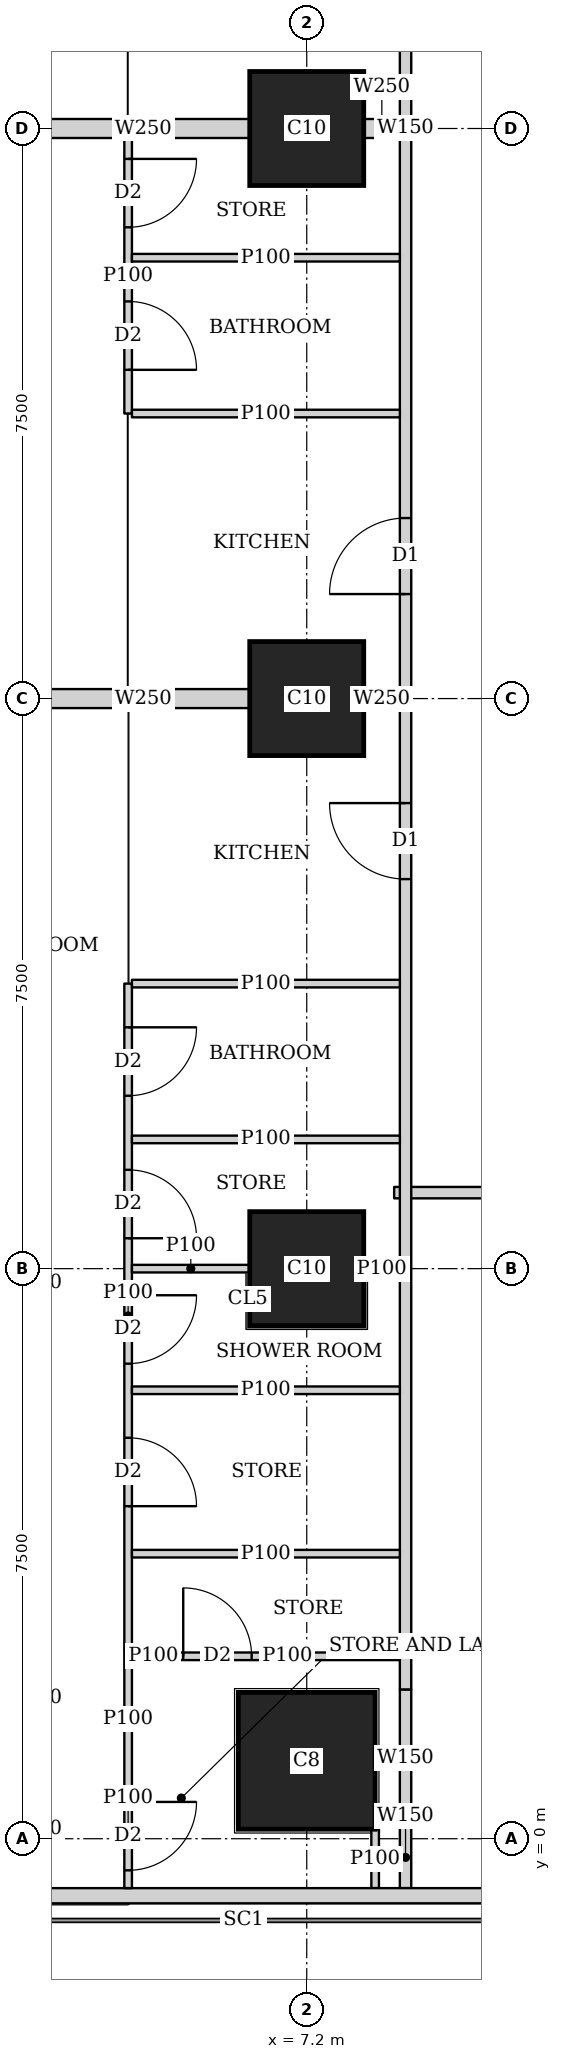
"""IFC4 building model, lengths in metres.
Left out: names, types, materials, properties, quantities, classifications, styles, units other than length and angle.
Written with IfcOpenShell. Run it as: python <this file> out.ifc"""

import sys

from ifc_helpers import new_model, si_unit, direction, frame, frame_2d, origin, origin_2d, place, context, subcontext, project, spatial, rectangle, extrude, element, fill, save


model = new_model("IFC4")
c1 = context("Model", 3, precision=1e-05, world=origin(), true_north=direction((0.0, 1.0)))
c2 = subcontext(c1, "Body", "Model", "MODEL_VIEW")
j1 = project(units=[si_unit("LENGTHUNIT", "METRE"), si_unit("PLANEANGLEUNIT", "RADIAN")], contexts=[c1])
p1 = place(None, origin())
s1 = spatial("IfcSite", under=j1, at=p1, CompositionType="ELEMENT")
p2 = place(p1, origin())
s2 = spatial("IfcBuilding", under=s1, at=p2, CompositionType="ELEMENT")
p3 = place(p2, frame((0.0, 0.0, 184.55)))
s3 = spatial("IfcBuildingStorey", under=s2, at=p3, CompositionType="ELEMENT", Elevation=184.55)
p4 = place(p3, frame((7.2, 1.025, 0.0), z_axis=(0.0, 0.0, 1.0), x_axis=(1.0, 0.0, 0.0)))
e1 = element("IfcColumn", 1, at=p4, inside=s3, PredefinedType="COLUMN", context=c2, shape_type="SweptSolid", body=[
    extrude(rectangle(XDim=1.8, YDim=1.8, at=origin_2d()), origin(), (0.0, 0.0, 1.0), 3.75),
])
for number, where, z_axis, x_axis in (
    (2, (7.2, 7.5, 0.0), (0.0, 0.0, 1.0), (1.0, 0.0, 0.0)),
    (3, (7.2, 15.0, 0.0), (0.0, 0.0, 1.0), (1.0, 0.0, 0.0)),
    (4, (7.2, 22.5, 0.0), (0.0, 0.0, 1.0), (1.0, 0.0, 0.0)),
):
    element("IfcColumn", number, at=place(p3, frame(where, z_axis=z_axis, x_axis=x_axis)), inside=s3, PredefinedType="COLUMN", context=c2, shape_type="SweptSolid", body=[
        extrude(rectangle(XDim=1.5, YDim=1.5, at=origin_2d()), origin(), (0.0, 0.0, 1.0), 3.75),
    ])
p5 = place(p3, frame((2.163, -0.75, 0.0), z_axis=(0.0, 0.0, 1.0), x_axis=(1.0, 0.0, 0.0)))
e5 = element("IfcWall", 5, at=p5, inside=s3, PredefinedType="SOLIDWALL", context=c2, shape_type="SweptSolid", body=[
    extrude(rectangle(XDim=45.628, YDim=0.2, at=frame_2d((22.814, 0.0))), origin(), (0.0, 0.0, 1.0), 3.45),
])
p6 = place(p5, frame((9.537, 0.0, 0.9)))
e6 = element("IfcOpeningElement", 6, at=p6, cuts=e5, PredefinedType="OPENING", context=c2, shape_type="SweptSolid", body=[
    extrude(rectangle(XDim=1.8, YDim=1.5, at=frame_2d((0.9, 0.75))), frame((0.0, 0.11, 0.0), z_axis=(0.0, -1.0, 0.0), x_axis=(1.0, 0.0, 0.0)), (0.0, 0.0, 1.0), 0.22),
])
p7 = place(p5, frame((13.137, 0.0, 0.9)))
e7 = element("IfcOpeningElement", 7, at=p7, cuts=e5, PredefinedType="OPENING", context=c2, shape_type="SweptSolid", body=[
    extrude(rectangle(XDim=1.8, YDim=1.5, at=frame_2d((0.9, 0.75))), frame((0.0, 0.11, 0.0), z_axis=(0.0, -1.0, 0.0), x_axis=(1.0, 0.0, 0.0)), (0.0, 0.0, 1.0), 0.22),
])
p8 = place(p5, frame((16.737, 0.0, 0.9)))
e8 = element("IfcOpeningElement", 8, at=p8, cuts=e5, PredefinedType="OPENING", context=c2, shape_type="SweptSolid", body=[
    extrude(rectangle(XDim=1.8, YDim=1.5, at=frame_2d((0.9, 0.75))), frame((0.0, 0.11, 0.0), z_axis=(0.0, -1.0, 0.0), x_axis=(1.0, 0.0, 0.0)), (0.0, 0.0, 1.0), 0.22),
])
p9 = place(p5, frame((20.337, 0.0, 0.9)))
e9 = element("IfcOpeningElement", 9, at=p9, cuts=e5, PredefinedType="OPENING", context=c2, shape_type="SweptSolid", body=[
    extrude(rectangle(XDim=1.8, YDim=1.5, at=frame_2d((0.9, 0.75))), frame((0.0, 0.11, 0.0), z_axis=(0.0, -1.0, 0.0), x_axis=(1.0, 0.0, 0.0)), (0.0, 0.0, 1.0), 0.22),
])
p10 = place(p5, frame((23.937, 0.0, 0.9)))
e10 = element("IfcOpeningElement", 10, at=p10, cuts=e5, PredefinedType="OPENING", context=c2, shape_type="SweptSolid", body=[
    extrude(rectangle(XDim=1.8, YDim=1.5, at=frame_2d((0.9, 0.75))), frame((0.0, 0.11, 0.0), z_axis=(0.0, -1.0, 0.0), x_axis=(1.0, 0.0, 0.0)), (0.0, 0.0, 1.0), 0.22),
])
p11 = place(p5, frame((27.537, 0.0, 0.9)))
e11 = element("IfcOpeningElement", 11, at=p11, cuts=e5, PredefinedType="OPENING", context=c2, shape_type="SweptSolid", body=[
    extrude(rectangle(XDim=1.8, YDim=1.5, at=frame_2d((0.9, 0.75))), frame((0.0, 0.11, 0.0), z_axis=(0.0, -1.0, 0.0), x_axis=(1.0, 0.0, 0.0)), (0.0, 0.0, 1.0), 0.22),
])
p12 = place(p5, frame((31.137, 0.0, 0.9)))
e12 = element("IfcOpeningElement", 12, at=p12, cuts=e5, PredefinedType="OPENING", context=c2, shape_type="SweptSolid", body=[
    extrude(rectangle(XDim=1.8, YDim=1.5, at=frame_2d((0.9, 0.75))), frame((0.0, 0.11, 0.0), z_axis=(0.0, -1.0, 0.0), x_axis=(1.0, 0.0, 0.0)), (0.0, 0.0, 1.0), 0.22),
])
p13 = place(p5, frame((34.737, 0.0, 0.9)))
e13 = element("IfcOpeningElement", 13, at=p13, cuts=e5, PredefinedType="OPENING", context=c2, shape_type="SweptSolid", body=[
    extrude(rectangle(XDim=1.8, YDim=1.5, at=frame_2d((0.9, 0.75))), frame((0.0, 0.11, 0.0), z_axis=(0.0, -1.0, 0.0), x_axis=(1.0, 0.0, 0.0)), (0.0, 0.0, 1.0), 0.22),
])
p14 = place(p3, frame((8.5, -0.65, 0.0), z_axis=(0.0, 0.0, 1.0), x_axis=(0.0, 1.0, 0.0)))
e14 = element("IfcWall", 14, at=p14, inside=s3, PredefinedType="SOLIDWALL", context=c2, shape_type="SweptSolid", body=[
    extrude(rectangle(XDim=0.809, YDim=0.15, at=frame_2d((0.404, 0.0))), origin(), (0.0, 0.0, 1.0), 3.45),
])
p15 = place(p3, frame((8.5, 0.159, 0.0), z_axis=(0.0, 0.0, 1.0), x_axis=(0.0, 1.0, 0.0)))
e15 = element("IfcWall", 15, at=p15, inside=s3, PredefinedType="SOLIDWALL", context=c2, shape_type="SweptSolid", body=[
    extrude(rectangle(XDim=1.805, YDim=0.15, at=frame_2d((0.903, 0.0))), origin(), (0.0, 0.0, 1.0), 2.05),
])
p16 = place(p3, frame((8.5, 1.964, 0.0), z_axis=(0.0, 0.0, 1.0), x_axis=(0.0, 1.0, 0.0)))
e16 = element("IfcWall", 16, at=p16, inside=s3, PredefinedType="SOLIDWALL", context=c2, shape_type="SweptSolid", body=[
    extrude(rectangle(XDim=41.097, YDim=0.15, at=frame_2d((20.548, 0.0))), origin(), (0.0, 0.0, 1.0), 3.45),
])
p17 = place(p16, frame((10.661, 0.0, 0.0)))
e17 = element("IfcOpeningElement", 17, at=p17, cuts=e16, PredefinedType="OPENING", context=c2, shape_type="SweptSolid", body=[
    extrude(rectangle(XDim=1.0, YDim=2.1, at=frame_2d((0.5, 1.05))), frame((0.0, 0.085, 0.0), z_axis=(0.0, -1.0, 0.0), x_axis=(1.0, 0.0, 0.0)), (0.0, 0.0, 1.0), 0.17),
])
p18 = place(p16, frame((14.411, 0.0, 0.0)))
e18 = element("IfcOpeningElement", 18, at=p18, cuts=e16, PredefinedType="OPENING", context=c2, shape_type="SweptSolid", body=[
    extrude(rectangle(XDim=1.0, YDim=2.1, at=frame_2d((0.5, 1.05))), frame((0.0, 0.085, 0.0), z_axis=(0.0, -1.0, 0.0), x_axis=(1.0, 0.0, 0.0)), (0.0, 0.0, 1.0), 0.17),
])
p19 = place(p16, frame((21.911, 0.0, 0.0)))
e19 = element("IfcOpeningElement", 19, at=p19, cuts=e16, PredefinedType="OPENING", context=c2, shape_type="SweptSolid", body=[
    extrude(rectangle(XDim=1.0, YDim=2.1, at=frame_2d((0.5, 1.05))), frame((0.0, 0.085, 0.0), z_axis=(0.0, -1.0, 0.0), x_axis=(1.0, 0.0, 0.0)), (0.0, 0.0, 1.0), 0.17),
])
p20 = place(p16, frame((33.161, 0.0, 0.0)))
e20 = element("IfcOpeningElement", 20, at=p20, cuts=e16, PredefinedType="OPENING", context=c2, shape_type="SweptSolid", body=[
    extrude(rectangle(XDim=1.0, YDim=2.1, at=frame_2d((0.5, 1.05))), frame((0.0, 0.085, 0.0), z_axis=(0.0, -1.0, 0.0), x_axis=(1.0, 0.0, 0.0)), (0.0, 0.0, 1.0), 0.17),
])
p21 = place(p3, frame((40.053, 8.5, 0.0), z_axis=(0.0, 0.0, 1.0), x_axis=(-1.0, 0.0, 0.0)))
e21 = element("IfcWall", 21, at=p21, inside=s3, PredefinedType="SOLIDWALL", context=c2, shape_type="SweptSolid", body=[
    extrude(rectangle(XDim=31.703, YDim=0.15, at=frame_2d((15.852, 0.0))), origin(), (0.0, 0.0, 1.0), 3.45),
])
p22 = place(p21, frame((28.103, 0.0, 0.0)))
e22 = element("IfcOpeningElement", 22, at=p22, cuts=e21, PredefinedType="OPENING", context=c2, shape_type="SweptSolid", body=[
    extrude(rectangle(XDim=1.0, YDim=2.1, at=frame_2d((0.5, 1.05))), frame((0.0, 0.085, 0.0), z_axis=(0.0, -1.0, 0.0), x_axis=(1.0, 0.0, 0.0)), (0.0, 0.0, 1.0), 0.17),
])
p23 = place(p21, frame((15.953, 0.0, 0.0)))
e23 = element("IfcOpeningElement", 23, at=p23, cuts=e21, PredefinedType="OPENING", context=c2, shape_type="SweptSolid", body=[
    extrude(rectangle(XDim=1.0, YDim=2.1, at=frame_2d((0.5, 1.05))), frame((0.0, 0.085, 0.0), z_axis=(0.0, -1.0, 0.0), x_axis=(1.0, 0.0, 0.0)), (0.0, 0.0, 1.0), 0.17),
])
p24 = place(p21, frame((8.753, 0.0, 0.0)))
e24 = element("IfcOpeningElement", 24, at=p24, cuts=e21, PredefinedType="OPENING", context=c2, shape_type="SweptSolid", body=[
    extrude(rectangle(XDim=1.0, YDim=2.1, at=frame_2d((0.5, 1.05))), frame((0.0, 0.085, 0.0), z_axis=(0.0, -1.0, 0.0), x_axis=(1.0, 0.0, 0.0)), (0.0, 0.0, 1.0), 0.17),
])
p25 = place(p3, frame((8.1, 0.124, 0.0), z_axis=(0.0, 0.0, 1.0), x_axis=(0.0, -1.0, 0.0)))
e25 = element("IfcWall", 25, at=p25, inside=s3, PredefinedType="PARTITIONING", context=c2, shape_type="SweptSolid", body=[
    extrude(rectangle(XDim=0.774, YDim=0.1, at=frame_2d((0.387, 0.0))), origin(), (0.0, 0.0, 1.0), 3.45),
])
p26 = place(p3, frame((4.85, -0.65, 0.0), z_axis=(0.0, 0.0, 1.0), x_axis=(0.0, 1.0, 0.0)))
e26 = element("IfcWall", 26, at=p26, inside=s3, PredefinedType="PARTITIONING", context=c2, shape_type="SweptSolid", body=[
    extrude(rectangle(XDim=1.284, YDim=0.1, at=frame_2d((0.642, 0.0))), origin(), (0.0, 0.0, 1.0), 3.45),
])
p27 = place(p26, frame((0.234, 0.0, 0.0)))
e27 = element("IfcOpeningElement", 27, at=p27, cuts=e26, PredefinedType="OPENING", context=c2, shape_type="SweptSolid", body=[
    extrude(rectangle(XDim=0.9, YDim=2.1, at=frame_2d((0.45, 1.05))), frame((0.0, 0.06, 0.0), z_axis=(0.0, -1.0, 0.0), x_axis=(1.0, 0.0, 0.0)), (0.0, 0.0, 1.0), 0.12),
])
p28 = place(p3, frame((4.85, 0.634, 0.0), z_axis=(0.0, 0.0, 1.0), x_axis=(0.0, 1.0, 0.0)))
e28 = element("IfcWall", 28, at=p28, inside=s3, PredefinedType="PARTITIONING", context=c2, shape_type="SweptSolid", body=[
    extrude(rectangle(XDim=1.871, YDim=0.1, at=frame_2d((0.936, 0.0))), origin(), (0.0, 0.0, 1.0), 2.05),
])
p29 = place(p3, frame((4.85, 2.505, 0.0), z_axis=(0.0, 0.0, 1.0), x_axis=(0.0, 1.0, 0.0)))
e29 = element("IfcWall", 29, at=p29, inside=s3, PredefinedType="PARTITIONING", context=c2, shape_type="SweptSolid", body=[
    extrude(rectangle(XDim=8.745, YDim=0.1, at=frame_2d((4.373, 0.0))), origin(), (0.0, 0.0, 1.0), 3.45),
])
p30 = place(p29, frame((7.27, 0.0, 0.0)))
e30 = element("IfcOpeningElement", 30, at=p30, cuts=e29, PredefinedType="OPENING", context=c2, shape_type="SweptSolid", body=[
    extrude(rectangle(XDim=0.9, YDim=2.1, at=frame_2d((0.45, 1.05))), frame((0.0, 0.06, 0.0), z_axis=(0.0, -1.0, 0.0), x_axis=(1.0, 0.0, 0.0)), (0.0, 0.0, 1.0), 0.12),
])
p31 = place(p29, frame((3.745, 0.0, 0.0)))
e31 = element("IfcOpeningElement", 31, at=p31, cuts=e29, PredefinedType="OPENING", context=c2, shape_type="SweptSolid", body=[
    extrude(rectangle(XDim=0.9, YDim=2.1, at=frame_2d((0.45, 1.05))), frame((0.0, 0.06, 0.0), z_axis=(0.0, -1.0, 0.0), x_axis=(1.0, 0.0, 0.0)), (0.0, 0.0, 1.0), 0.12),
])
p32 = place(p29, frame((5.395, 0.0, 0.0)))
e32 = element("IfcOpeningElement", 32, at=p32, cuts=e29, PredefinedType="OPENING", context=c2, shape_type="SweptSolid", body=[
    extrude(rectangle(XDim=0.9, YDim=2.1, at=frame_2d((0.45, 1.05))), frame((0.0, 0.06, 0.0), z_axis=(0.0, -1.0, 0.0), x_axis=(1.0, 0.0, 0.0)), (0.0, 0.0, 1.0), 0.12),
])
p33 = place(p29, frame((1.87, 0.0, 0.0)))
e33 = element("IfcOpeningElement", 33, at=p33, cuts=e29, PredefinedType="OPENING", context=c2, shape_type="SweptSolid", body=[
    extrude(rectangle(XDim=0.9, YDim=2.1, at=frame_2d((0.45, 1.05))), frame((0.0, 0.06, 0.0), z_axis=(0.0, -1.0, 0.0), x_axis=(1.0, 0.0, 0.0)), (0.0, 0.0, 1.0), 0.12),
])
p34 = place(p3, frame((4.9, 3.75, 0.0), z_axis=(0.0, 0.0, 1.0), x_axis=(1.0, 0.0, 0.0)))
e34 = element("IfcWall", 34, at=p34, inside=s3, PredefinedType="PARTITIONING", context=c2, shape_type="SweptSolid", body=[
    extrude(rectangle(XDim=3.525, YDim=0.1, at=frame_2d((1.763, 0.0))), origin(), (0.0, 0.0, 1.0), 3.45),
])
p35 = place(p3, frame((4.9, 7.5, 0.0), z_axis=(0.0, 0.0, 1.0), x_axis=(1.0, 0.0, 0.0)))
e35 = element("IfcWall", 35, at=p35, inside=s3, PredefinedType="PARTITIONING", context=c2, shape_type="SweptSolid", body=[
    extrude(rectangle(XDim=1.549, YDim=0.1, at=frame_2d((0.774, 0.0))), origin(), (0.0, 0.0, 1.0), 3.45),
])
p36 = place(p3, frame((7.951, 7.5, 0.0), z_axis=(0.0, 0.0, 1.0), x_axis=(1.0, 0.0, 0.0)))
e36 = element("IfcWall", 36, at=p36, inside=s3, PredefinedType="PARTITIONING", context=c2, shape_type="SweptSolid", body=[
    extrude(rectangle(XDim=0.474, YDim=0.1, at=frame_2d((0.237, 0.0))), origin(), (0.0, 0.0, 1.0), 3.45),
])
for number, where, z_axis, x_axis in (
    (37, (4.9, 11.25, 0.0), (0.0, 0.0, 1.0), (1.0, 0.0, 0.0)),
    (38, (4.9, 9.2, 0.0), (0.0, 0.0, 1.0), (1.0, 0.0, 0.0)),
    (39, (4.9, 5.9, 0.0), (0.0, 0.0, 1.0), (1.0, 0.0, 0.0)),
):
    element("IfcWall", number, at=place(p3, frame(where, z_axis=z_axis, x_axis=x_axis)), inside=s3, PredefinedType="PARTITIONING", context=c2, shape_type="SweptSolid", body=[
        extrude(rectangle(XDim=3.525, YDim=0.1, at=frame_2d((1.763, 0.0))), origin(), (0.0, 0.0, 1.0), 3.45),
    ])
p37 = place(p3, frame((4.85, 18.75, 0.0), z_axis=(0.0, 0.0, 1.0), x_axis=(0.0, 1.0, 0.0)))
e40 = element("IfcWall", 40, at=p37, inside=s3, PredefinedType="PARTITIONING", context=c2, shape_type="SweptSolid", body=[
    extrude(rectangle(XDim=3.625, YDim=0.1, at=frame_2d((1.812, 0.0))), origin(), (0.0, 0.0, 1.0), 3.45),
])
p38 = place(p37, frame((0.575, 0.0, 0.0)))
e41 = element("IfcOpeningElement", 41, at=p38, cuts=e40, PredefinedType="OPENING", context=c2, shape_type="SweptSolid", body=[
    extrude(rectangle(XDim=0.9, YDim=2.1, at=frame_2d((0.45, 1.05))), frame((0.0, 0.06, 0.0), z_axis=(0.0, -1.0, 0.0), x_axis=(1.0, 0.0, 0.0)), (0.0, 0.0, 1.0), 0.12),
])
p39 = place(p37, frame((2.45, 0.0, 0.0)))
e42 = element("IfcOpeningElement", 42, at=p39, cuts=e40, PredefinedType="OPENING", context=c2, shape_type="SweptSolid", body=[
    extrude(rectangle(XDim=0.9, YDim=2.1, at=frame_2d((0.45, 1.05))), frame((0.0, 0.06, 0.0), z_axis=(0.0, -1.0, 0.0), x_axis=(1.0, 0.0, 0.0)), (0.0, 0.0, 1.0), 0.12),
])
for number, where, z_axis, x_axis in (
    (43, (4.9, 18.75, 0.0), (0.0, 0.0, 1.0), (1.0, 0.0, 0.0)),
    (44, (4.9, 20.8, 0.0), (0.0, 0.0, 1.0), (1.0, 0.0, 0.0)),
):
    element("IfcWall", number, at=place(p3, frame(where, z_axis=z_axis, x_axis=x_axis)), inside=s3, PredefinedType="PARTITIONING", context=c2, shape_type="SweptSolid", body=[
        extrude(rectangle(XDim=3.525, YDim=0.1, at=frame_2d((1.763, 0.0))), origin(), (0.0, 0.0, 1.0), 3.45),
    ])
p40 = place(p3, frame((3.65, 15.0, 0.0), z_axis=(0.0, 0.0, 1.0), x_axis=(1.0, 0.0, 0.0)))
e45 = element("IfcWall", 45, at=p40, inside=s3, PredefinedType="SOLIDWALL", context=c2, shape_type="SweptSolid", body=[
    extrude(rectangle(XDim=2.799, YDim=0.25, at=frame_2d((1.399, 0.0))), origin(), (0.0, 0.0, 1.0), 3.45),
])
p41 = place(p3, frame((7.951, 15.0, 0.0), z_axis=(0.0, 0.0, 1.0), x_axis=(1.0, 0.0, 0.0)))
e46 = element("IfcWall", 46, at=p41, inside=s3, PredefinedType="SOLIDWALL", context=c2, shape_type="SweptSolid", body=[
    extrude(rectangle(XDim=0.474, YDim=0.25, at=frame_2d((0.237, 0.0))), origin(), (0.0, 0.0, 1.0), 3.45),
])
p42 = place(p3, frame((3.65, 22.5, 0.0), z_axis=(0.0, 0.0, 1.0), x_axis=(1.0, 0.0, 0.0)))
e47 = element("IfcWall", 47, at=p42, inside=s3, PredefinedType="SOLIDWALL", context=c2, shape_type="SweptSolid", body=[
    extrude(rectangle(XDim=2.799, YDim=0.25, at=frame_2d((1.399, 0.0))), origin(), (0.0, 0.0, 1.0), 3.45),
])
p43 = place(p3, frame((7.951, 22.5, 0.0), z_axis=(0.0, 0.0, 1.0), x_axis=(1.0, 0.0, 0.0)))
e48 = element("IfcWall", 48, at=p43, inside=s3, PredefinedType="SOLIDWALL", context=c2, shape_type="SweptSolid", body=[
    extrude(rectangle(XDim=0.474, YDim=0.25, at=frame_2d((0.237, 0.0))), origin(), (0.0, 0.0, 1.0), 3.45),
])
p44 = place(p3, frame((5.467, 2.4, 0.0), z_axis=(0.0, 0.0, 1.0), x_axis=(1.0, 0.0, 0.0)))
e49 = element("IfcWall", 49, at=p44, inside=s3, PredefinedType="PARTITIONING", context=c2, shape_type="SweptSolid", body=[
    extrude(rectangle(XDim=2.958, YDim=0.1, at=frame_2d((1.479, 0.0))), origin(), (0.0, 0.0, 1.0), 3.45),
])
p45 = place(p44, frame((0.108, 0.0, 0.0)))
e50 = element("IfcOpeningElement", 50, at=p45, cuts=e49, PredefinedType="OPENING", context=c2, shape_type="SweptSolid", body=[
    extrude(rectangle(XDim=0.9, YDim=2.1, at=frame_2d((0.45, 1.05))), frame((0.0, 0.06, 0.0), z_axis=(0.0, -1.0, 0.0), x_axis=(1.0, 0.0, 0.0)), (0.0, 0.0, 1.0), 0.12),
])
p46 = place(p3, frame((5.467, 2.4, 0.0), z_axis=(0.0, 0.0, 1.0), x_axis=(-1.0, 0.0, 0.0)))
e51 = element("IfcWall", 51, at=p46, inside=s3, PredefinedType="PARTITIONING", context=c2, shape_type="SweptSolid", body=[
    extrude(rectangle(XDim=0.567, YDim=0.1, at=frame_2d((0.284, 0.0))), origin(), (0.0, 0.0, 1.0), 2.05),
])
p47 = place(p30, origin())
e52 = element("IfcDoor", 52, at=p47, inside=s3, OperationType="SINGLE_SWING_LEFT", PredefinedType="DOOR", context=c2, shape_type="SweptSolid", body=[
    extrude(rectangle(XDim=0.9, YDim=2.1, at=frame_2d((0.45, 1.05))), frame((0.0, 0.025, 0.0), z_axis=(0.0, -1.0, 0.0), x_axis=(1.0, 0.0, 0.0)), (0.0, 0.0, 1.0), 0.05),
])
fill(e30, e52)
p48 = place(p31, origin())
e53 = element("IfcDoor", 53, at=p48, inside=s3, OperationType="SINGLE_SWING_LEFT", PredefinedType="DOOR", context=c2, shape_type="SweptSolid", body=[
    extrude(rectangle(XDim=0.9, YDim=2.1, at=frame_2d((0.45, 1.05))), frame((0.0, 0.025, 0.0), z_axis=(0.0, -1.0, 0.0), x_axis=(1.0, 0.0, 0.0)), (0.0, 0.0, 1.0), 0.05),
])
fill(e31, e53)
p49 = place(p27, origin())
e54 = element("IfcDoor", 54, at=p49, inside=s3, OperationType="SINGLE_SWING_LEFT", PredefinedType="DOOR", context=c2, shape_type="SweptSolid", body=[
    extrude(rectangle(XDim=0.9, YDim=2.1, at=frame_2d((0.45, 1.05))), frame((0.0, 0.025, 0.0), z_axis=(0.0, -1.0, 0.0), x_axis=(1.0, 0.0, 0.0)), (0.0, 0.0, 1.0), 0.05),
])
fill(e27, e54)
p50 = place(p32, origin())
e55 = element("IfcDoor", 55, at=p50, inside=s3, OperationType="SINGLE_SWING_RIGHT", PredefinedType="DOOR", context=c2, shape_type="SweptSolid", body=[
    extrude(rectangle(XDim=0.9, YDim=2.1, at=frame_2d((0.45, 1.05))), frame((0.0, 0.025, 0.0), z_axis=(0.0, -1.0, 0.0), x_axis=(1.0, 0.0, 0.0)), (0.0, 0.0, 1.0), 0.05),
])
fill(e32, e55)
p51 = place(p33, origin())
e56 = element("IfcDoor", 56, at=p51, inside=s3, OperationType="SINGLE_SWING_RIGHT", PredefinedType="DOOR", context=c2, shape_type="SweptSolid", body=[
    extrude(rectangle(XDim=0.9, YDim=2.1, at=frame_2d((0.45, 1.05))), frame((0.0, 0.025, 0.0), z_axis=(0.0, -1.0, 0.0), x_axis=(1.0, 0.0, 0.0)), (0.0, 0.0, 1.0), 0.05),
])
fill(e33, e56)
p52 = place(p17, origin())
e57 = element("IfcDoor", 57, at=p52, inside=s3, OperationType="SINGLE_SWING_RIGHT", PredefinedType="DOOR", context=c2, shape_type="SweptSolid", body=[
    extrude(rectangle(XDim=1.0, YDim=2.1, at=frame_2d((0.5, 1.05))), frame((0.0, 0.025, 0.0), z_axis=(0.0, -1.0, 0.0), x_axis=(1.0, 0.0, 0.0)), (0.0, 0.0, 1.0), 0.05),
])
fill(e17, e57)
p53 = place(p38, origin())
e58 = element("IfcDoor", 58, at=p53, inside=s3, OperationType="SINGLE_SWING_RIGHT", PredefinedType="DOOR", context=c2, shape_type="SweptSolid", body=[
    extrude(rectangle(XDim=0.9, YDim=2.1, at=frame_2d((0.45, 1.05))), frame((0.0, 0.025, 0.0), z_axis=(0.0, -1.0, 0.0), x_axis=(1.0, 0.0, 0.0)), (0.0, 0.0, 1.0), 0.05),
])
fill(e41, e58)
p54 = place(p39, origin())
e59 = element("IfcDoor", 59, at=p54, inside=s3, OperationType="SINGLE_SWING_LEFT", PredefinedType="DOOR", context=c2, shape_type="SweptSolid", body=[
    extrude(rectangle(XDim=0.9, YDim=2.1, at=frame_2d((0.45, 1.05))), frame((0.0, 0.025, 0.0), z_axis=(0.0, -1.0, 0.0), x_axis=(1.0, 0.0, 0.0)), (0.0, 0.0, 1.0), 0.05),
])
fill(e42, e59)
p55 = place(p18, origin())
e60 = element("IfcDoor", 60, at=p55, inside=s3, OperationType="SINGLE_SWING_LEFT", PredefinedType="DOOR", context=c2, shape_type="SweptSolid", body=[
    extrude(rectangle(XDim=1.0, YDim=2.1, at=frame_2d((0.5, 1.05))), frame((0.0, 0.025, 0.0), z_axis=(0.0, -1.0, 0.0), x_axis=(1.0, 0.0, 0.0)), (0.0, 0.0, 1.0), 0.05),
])
fill(e18, e60)
p56 = place(p45, origin())
e61 = element("IfcDoor", 61, at=p56, inside=s3, OperationType="SINGLE_SWING_LEFT", PredefinedType="DOOR", context=c2, shape_type="SweptSolid", body=[
    extrude(rectangle(XDim=0.9, YDim=2.1, at=frame_2d((0.45, 1.05))), frame((0.0, 0.025, 0.0), z_axis=(0.0, -1.0, 0.0), x_axis=(1.0, 0.0, 0.0)), (0.0, 0.0, 1.0), 0.05),
])
fill(e50, e61)
save(model, sys.argv[1])
